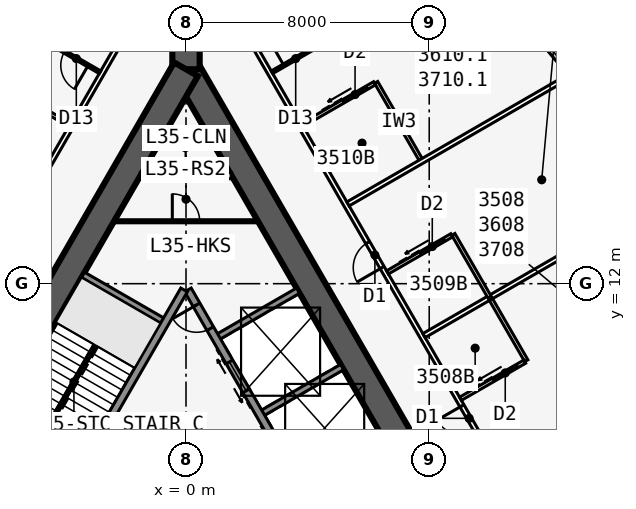
"""IFC4 building model, lengths in metres.
Left out: names, types, materials, properties, quantities, classifications, styles, units other than length and angle.
Written with IfcOpenShell. Run it as: python <this file> out.ifc"""

import sys

from ifc_helpers import new_model, si_unit, direction, frame, frame_2d, origin, place, context, subcontext, project, spatial, rectangle, extrude, element, fill, save


model = new_model("IFC4")
c1 = context("Model", 3, precision=1e-05, world=origin(), true_north=direction((0.0, 1.0)))
c2 = subcontext(c1, "Body", "Model", "MODEL_VIEW")
j1 = project(units=[si_unit("LENGTHUNIT", "METRE"), si_unit("PLANEANGLEUNIT", "RADIAN")], contexts=[c1])
p1 = place(None, origin())
s1 = spatial("IfcSite", under=j1, at=p1, CompositionType="ELEMENT")
p2 = place(p1, origin())
s2 = spatial("IfcBuilding", under=s1, at=p2, CompositionType="ELEMENT")
p3 = place(p2, frame((0.0, 0.0, 135.1)))
s3 = spatial("IfcBuildingStorey", under=s2, at=p3, CompositionType="ELEMENT", Elevation=135.1)
p4 = place(p3, frame((16.5, -9.526, 0.0), z_axis=(0.0, 0.0, 1.0), x_axis=(-0.499999749417, 0.866025548458, 0.0)))
e1 = element("IfcWall", 1, at=p4, inside=s3, PredefinedType="SHEAR", context=c2, shape_type="SweptSolid", body=[
    extrude(rectangle(XDim=33.0, YDim=0.9, at=frame_2d((16.5, 0.0))), origin(), (0.0, 0.0, 1.0), 3.4),
])
p5 = place(p4, frame((14.15, 0.0, 0.0)))
e2 = element("IfcOpeningElement", 2, at=p5, cuts=e1, PredefinedType="OPENING", context=c2, shape_type="SweptSolid", body=[
    extrude(rectangle(XDim=1.8, YDim=2.13, at=frame_2d((0.9, 1.065))), frame((0.0, 0.46, 0.0), z_axis=(0.0, -1.0, 0.0), x_axis=(1.0, 0.0, 0.0)), (0.0, 0.0, 1.0), 0.92),
])
p6 = place(p4, frame((12.6, 0.0, 0.0)))
e3 = element("IfcOpeningElement", 3, at=p6, cuts=e1, PredefinedType="OPENING", context=c2, shape_type="SweptSolid", body=[
    extrude(rectangle(XDim=1.0, YDim=2.13, at=frame_2d((0.5, 1.065))), frame((0.0, 0.46, 0.0), z_axis=(0.0, -1.0, 0.0), x_axis=(1.0, 0.0, 0.0)), (0.0, 0.0, 1.0), 0.92),
])
p7 = place(p3, frame((5.379, 2.586, 0.0), z_axis=(0.0, 0.0, 1.0), x_axis=(-0.500001375892, 0.866024609411, 0.0)))
e4 = element("IfcWall", 4, at=p7, inside=s3, PredefinedType="SOLIDWALL", context=c2, shape_type="SweptSolid", body=[
    extrude(rectangle(XDim=10.633, YDim=0.25, at=frame_2d((5.316, 0.0))), origin(), (0.0, 0.0, 1.0), 3.235),
])
p8 = place(p7, frame((9.164, 0.0, 0.0)))
e5 = element("IfcOpeningElement", 5, at=p8, cuts=e4, PredefinedType="OPENING", context=c2, shape_type="SweptSolid", body=[
    extrude(rectangle(XDim=0.9, YDim=2.13, at=frame_2d((0.45, 1.065))), frame((0.0, 0.135, 0.0), z_axis=(0.0, -1.0, 0.0), x_axis=(1.0, 0.0, 0.0)), (0.0, 0.0, 1.0), 0.27),
])
p9 = place(p7, frame((1.0, 0.0, 0.0)))
e6 = element("IfcOpeningElement", 6, at=p9, cuts=e4, PredefinedType="OPENING", context=c2, shape_type="SweptSolid", body=[
    extrude(rectangle(XDim=1.1, YDim=2.13, at=frame_2d((0.55, 1.065))), frame((0.0, 0.135, 0.0), z_axis=(0.0, -1.0, 0.0), x_axis=(1.0, 0.0, 0.0)), (0.0, 0.0, 1.0), 0.27),
])
p10 = place(p7, frame((3.9, 0.0, 0.0)))
e7 = element("IfcOpeningElement", 7, at=p10, cuts=e4, PredefinedType="OPENING", context=c2, shape_type="SweptSolid", body=[
    extrude(rectangle(XDim=1.1, YDim=2.13, at=frame_2d((0.55, 1.065))), frame((0.0, 0.135, 0.0), z_axis=(0.0, -1.0, 0.0), x_axis=(1.0, 0.0, 0.0)), (0.0, 0.0, 1.0), 0.27),
])
p11 = place(p7, frame((6.8, 0.0, 0.0)))
e8 = element("IfcOpeningElement", 8, at=p11, cuts=e4, PredefinedType="OPENING", context=c2, shape_type="SweptSolid", body=[
    extrude(rectangle(XDim=1.1, YDim=2.13, at=frame_2d((0.55, 1.065))), frame((0.0, 0.135, 0.0), z_axis=(0.0, -1.0, 0.0), x_axis=(1.0, 0.0, 0.0)), (0.0, 0.0, 1.0), 0.27),
])
for number, where, z_axis, x_axis in (
    (9, (2.429, 7.696, 0.0), (0.0, 0.0, 1.0), (0.866, 0.5, 0.0)),
    (10, (0.979, 10.207, 0.0), (0.0, 0.0, 1.0), (0.866, 0.5, 0.0)),
):
    element("IfcWall", number, at=place(p3, frame(where, z_axis=z_axis, x_axis=x_axis)), inside=s3, PredefinedType="SOLIDWALL", context=c2, shape_type="SweptSolid", body=[
        extrude(rectangle(XDim=3.125, YDim=0.2, at=frame_2d((1.562, 0.0))), origin(), (0.0, 0.0, 1.0), 3.235),
    ])
p12 = place(p3, frame((0.0, 19.052, 0.0), z_axis=(0.0, 0.0, 1.0), x_axis=(-0.499999749417, -0.866025548458, 0.0)))
e11 = element("IfcWall", 11, at=p12, inside=s3, PredefinedType="SHEAR", context=c2, shape_type="SweptSolid", body=[
    extrude(rectangle(XDim=33.0, YDim=0.9, at=frame_2d((16.5, 0.0))), origin(), (0.0, 0.0, 1.0), 3.4),
])
p13 = place(p12, frame((14.15, 0.0, 0.0)))
e12 = element("IfcOpeningElement", 12, at=p13, cuts=e11, PredefinedType="OPENING", context=c2, shape_type="SweptSolid", body=[
    extrude(rectangle(XDim=1.8, YDim=2.13, at=frame_2d((0.9, 1.065))), frame((0.0, 0.46, 0.0), z_axis=(0.0, -1.0, 0.0), x_axis=(1.0, 0.0, 0.0)), (0.0, 0.0, 1.0), 0.92),
])
p14 = place(p12, frame((12.6, 0.0, 0.0)))
e13 = element("IfcOpeningElement", 13, at=p14, cuts=e11, PredefinedType="OPENING", context=c2, shape_type="SweptSolid", body=[
    extrude(rectangle(XDim=1.0, YDim=2.13, at=frame_2d((0.5, 1.065))), frame((0.0, 0.46, 0.0), z_axis=(0.0, -1.0, 0.0), x_axis=(1.0, 0.0, 0.0)), (0.0, 0.0, 1.0), 0.92),
])
p15 = place(p3, frame((-0.062, 11.794, 0.0), z_axis=(0.0, 0.0, 1.0), x_axis=(-0.500006680225, -0.86602154692, 0.0)))
e14 = element("IfcWall", 14, at=p15, inside=s3, PredefinedType="SOLIDWALL", context=c2, shape_type="SweptSolid", body=[
    extrude(rectangle(XDim=7.733, YDim=0.25, at=frame_2d((3.866, 0.0))), origin(), (0.0, 0.0, 1.0), 3.235),
])
p16 = place(p3, frame((-0.679, 10.727, 0.0), z_axis=(0.0, 0.0, 1.0), x_axis=(-0.866022959057, 0.500004234368, 0.0)))
e15 = element("IfcWall", 15, at=p16, inside=s3, PredefinedType="SOLIDWALL", context=c2, shape_type="SweptSolid", body=[
    extrude(rectangle(XDim=3.125, YDim=0.2, at=frame_2d((1.562, 0.0))), origin(), (0.0, 0.0, 1.0), 3.235),
])
p17 = place(p3, frame((0.0, 19.052, 0.0), z_axis=(0.0, 0.0, 1.0), x_axis=(0.0, 1.0, 0.0)))
e16 = element("IfcWall", 16, at=p17, inside=s3, PredefinedType="SHEAR", context=c2, shape_type="SweptSolid", body=[
    extrude(rectangle(XDim=4.746, YDim=0.9, at=frame_2d((2.373, 0.0))), origin(), (0.0, 0.0, 1.0), 3.4),
])
p18 = place(p17, frame((1.8, 0.0, 0.0)))
e17 = element("IfcOpeningElement", 17, at=p18, cuts=e16, PredefinedType="OPENING", context=c2, shape_type="SweptSolid", body=[
    extrude(rectangle(XDim=1.8, YDim=2.13, at=frame_2d((0.9, 1.065))), frame((0.0, 0.46, 0.0), z_axis=(0.0, -1.0, 0.0), x_axis=(1.0, 0.0, 0.0)), (0.0, 0.0, 1.0), 0.92),
])
p19 = place(p3, frame((12.723, 18.868, 0.0), z_axis=(0.0, 0.0, 1.0), x_axis=(-0.641810386606, 0.766863369607, 0.0)))
e18 = element("IfcWall", 18, at=p19, inside=s3, PredefinedType="STANDARD", context=c2, shape_type="SweptSolid", body=[
    extrude(rectangle(XDim=5.076, YDim=0.25, at=frame_2d((2.538, 0.0))), origin(), (0.0, 0.0, 1.0), 3.235),
])
p20 = place(p19, frame((0.738, 0.0, 0.45)))
e19 = element("IfcOpeningElement", 19, at=p20, cuts=e18, PredefinedType="OPENING", context=c2, shape_type="SweptSolid", body=[
    extrude(rectangle(XDim=3.6, YDim=2.4, at=frame_2d((1.8, 1.2))), frame((0.0, 0.135, 0.0), z_axis=(0.0, -1.0, 0.0), x_axis=(1.0, 0.0, 0.0)), (0.0, 0.0, 1.0), 0.27),
])
p21 = place(p3, frame((20.027, -10.985, 0.0), z_axis=(0.0, 0.0, 1.0), x_axis=(-0.500001677587, 0.866024435227, 0.0)))
e20 = element("IfcWall", 20, at=p21, inside=s3, PredefinedType="PARTITIONING", context=c2, shape_type="SweptSolid", body=[
    extrude(rectangle(XDim=39.054, YDim=0.15, at=frame_2d((19.527, 0.0))), origin(), (0.0, 0.0, 1.0), 3.235),
])
p22 = place(p21, frame((1.558, 0.0, 0.0)))
e21 = element("IfcOpeningElement", 21, at=p22, cuts=e20, PredefinedType="OPENING", context=c2, shape_type="SweptSolid", body=[
    extrude(rectangle(XDim=0.95, YDim=2.13, at=frame_2d((0.475, 1.065))), frame((0.0, 0.085, 0.0), z_axis=(0.0, -1.0, 0.0), x_axis=(1.0, 0.0, 0.0)), (0.0, 0.0, 1.0), 0.17),
])
p23 = place(p21, frame((10.352, 0.0, 0.0)))
e22 = element("IfcOpeningElement", 22, at=p23, cuts=e20, PredefinedType="OPENING", context=c2, shape_type="SweptSolid", body=[
    extrude(rectangle(XDim=0.95, YDim=2.13, at=frame_2d((0.475, 1.065))), frame((0.0, 0.085, 0.0), z_axis=(0.0, -1.0, 0.0), x_axis=(1.0, 0.0, 0.0)), (0.0, 0.0, 1.0), 0.17),
])
p24 = place(p21, frame((17.152, 0.0, 0.0)))
e23 = element("IfcOpeningElement", 23, at=p24, cuts=e20, PredefinedType="OPENING", context=c2, shape_type="SweptSolid", body=[
    extrude(rectangle(XDim=0.95, YDim=2.13, at=frame_2d((0.475, 1.065))), frame((0.0, 0.085, 0.0), z_axis=(0.0, -1.0, 0.0), x_axis=(1.0, 0.0, 0.0)), (0.0, 0.0, 1.0), 0.17),
])
p25 = place(p21, frame((20.952, 0.0, 0.0)))
e24 = element("IfcOpeningElement", 24, at=p25, cuts=e20, PredefinedType="OPENING", context=c2, shape_type="SweptSolid", body=[
    extrude(rectangle(XDim=0.95, YDim=2.13, at=frame_2d((0.475, 1.065))), frame((0.0, 0.085, 0.0), z_axis=(0.0, -1.0, 0.0), x_axis=(1.0, 0.0, 0.0)), (0.0, 0.0, 1.0), 0.17),
])
p26 = place(p21, frame((27.152, 0.0, 0.0)))
e25 = element("IfcOpeningElement", 25, at=p26, cuts=e20, PredefinedType="OPENING", context=c2, shape_type="SweptSolid", body=[
    extrude(rectangle(XDim=0.95, YDim=2.13, at=frame_2d((0.475, 1.065))), frame((0.0, 0.085, 0.0), z_axis=(0.0, -1.0, 0.0), x_axis=(1.0, 0.0, 0.0)), (0.0, 0.0, 1.0), 0.17),
])
p27 = place(p21, frame((36.546, 0.0, 0.0)))
e26 = element("IfcOpeningElement", 26, at=p27, cuts=e20, PredefinedType="OPENING", context=c2, shape_type="SweptSolid", body=[
    extrude(rectangle(XDim=0.95, YDim=2.13, at=frame_2d((0.475, 1.065))), frame((0.0, 0.085, 0.0), z_axis=(0.0, -1.0, 0.0), x_axis=(1.0, 0.0, 0.0)), (0.0, 0.0, 1.0), 0.17),
])
p28 = place(p3, frame((10.329, 5.963, 0.0), z_axis=(0.0, 0.0, 1.0), x_axis=(0.866025170687, 0.500000403736, 0.0)))
e27 = element("IfcWall", 27, at=p28, inside=s3, PredefinedType="PARTITIONING", context=c2, shape_type="SweptSolid", body=[
    extrude(rectangle(XDim=9.099, YDim=0.15, at=frame_2d((4.549, 0.0))), origin(), (0.0, 0.0, 1.0), 2.389),
])
p29 = place(p3, frame((7.829, 10.293, 0.0), z_axis=(0.0, 0.0, 1.0), x_axis=(0.866027015393, 0.499997208602, 0.0)))
e28 = element("IfcWall", 28, at=p29, inside=s3, PredefinedType="PARTITIONING", context=c2, shape_type="SweptSolid", body=[
    extrude(rectangle(XDim=8.922, YDim=0.15, at=frame_2d((4.461, 0.0))), origin(), (0.0, 0.0, 1.0), 2.389),
])
p30 = place(p3, frame((5.329, 14.623, 0.0), z_axis=(0.0, 0.0, 1.0), x_axis=(0.866011723728, 0.500023693804, 0.0)))
e29 = element("IfcWall", 29, at=p30, inside=s3, PredefinedType="PARTITIONING", context=c2, shape_type="SweptSolid", body=[
    extrude(rectangle(XDim=8.395, YDim=0.15, at=frame_2d((4.198, 0.0))), origin(), (0.0, 0.0, 1.0), 2.389),
])
p31 = place(p3, frame((2.829, 18.954, 0.0), z_axis=(0.0, 0.0, 1.0), x_axis=(0.866015739374, 0.500016738876, 0.0)))
e30 = element("IfcWall", 30, at=p31, inside=s3, PredefinedType="PARTITIONING", context=c2, shape_type="SweptSolid", body=[
    extrude(rectangle(XDim=7.516, YDim=0.1, at=frame_2d((3.758, 0.0))), origin(), (0.0, 0.0, 1.0), 2.389),
])
p32 = place(p31, frame((0.45, 0.0, 0.0)))
e31 = element("IfcOpeningElement", 31, at=p32, cuts=e30, PredefinedType="OPENING", context=c2, shape_type="SweptSolid", body=[
    extrude(rectangle(XDim=0.9, YDim=2.13, at=frame_2d((0.45, 1.065))), frame((0.0, 0.06, 0.0), z_axis=(0.0, -1.0, 0.0), x_axis=(1.0, 0.0, 0.0)), (0.0, 0.0, 1.0), 0.12),
])
p33 = place(p3, frame((11.194, 9.465, 0.0), z_axis=(0.0, 0.0, 1.0), x_axis=(-0.500077600433, 0.865980596518, 0.0)))
e32 = element("IfcWall", 32, at=p33, inside=s3, PredefinedType="PLUMBINGWALL", context=c2, shape_type="SweptSolid", body=[
    extrude(rectangle(XDim=2.4, YDim=0.12, at=frame_2d((1.2, 0.0))), origin(), (0.0, 0.0, 1.0), 3.235),
])
p34 = place(p3, frame((9.029, 8.215, 0.0), z_axis=(0.0, 0.0, 1.0), x_axis=(0.866023955769, 0.500002508028, 0.0)))
e33 = element("IfcWall", 33, at=p34, inside=s3, PredefinedType="PLUMBINGWALL", context=c2, shape_type="SweptSolid", body=[
    extrude(rectangle(XDim=2.44, YDim=0.12, at=frame_2d((1.22, 0.0))), origin(), (0.0, 0.0, 1.0), 3.235),
])
p35 = place(p34, frame((1.25, 0.0, 0.0)))
e34 = element("IfcOpeningElement", 34, at=p35, cuts=e33, PredefinedType="OPENING", context=c2, shape_type="SweptSolid", body=[
    extrude(rectangle(XDim=0.9, YDim=2.13, at=frame_2d((0.45, 1.065))), frame((0.0, 0.07, 0.0), z_axis=(0.0, -1.0, 0.0), x_axis=(1.0, 0.0, 0.0)), (0.0, 0.0, 1.0), 0.14),
])
p36 = place(p3, frame((9.993, 11.543, 0.0), z_axis=(0.0, 0.0, 1.0), x_axis=(-0.500001309137, 0.866024647952, 0.0)))
e35 = element("IfcWall", 35, at=p36, inside=s3, PredefinedType="PLUMBINGWALL", context=c2, shape_type="SweptSolid", body=[
    extrude(rectangle(XDim=2.4, YDim=0.12, at=frame_2d((1.2, 0.0))), origin(), (0.0, 0.0, 1.0), 3.235),
])
p37 = place(p3, frame((6.628, 12.372, 0.0), z_axis=(0.0, 0.0, 1.0), x_axis=(0.866005645448, 0.500034220881, 0.0)))
e36 = element("IfcWall", 36, at=p37, inside=s3, PredefinedType="PLUMBINGWALL", context=c2, shape_type="SweptSolid", body=[
    extrude(rectangle(XDim=2.44, YDim=0.12, at=frame_2d((1.22, 0.0))), origin(), (0.0, 0.0, 1.0), 3.235),
])
p38 = place(p37, frame((1.25, 0.0, 0.0)))
e37 = element("IfcOpeningElement", 37, at=p38, cuts=e36, PredefinedType="OPENING", context=c2, shape_type="SweptSolid", body=[
    extrude(rectangle(XDim=0.9, YDim=2.13, at=frame_2d((0.45, 1.065))), frame((0.0, 0.07, 0.0), z_axis=(0.0, -1.0, 0.0), x_axis=(1.0, 0.0, 0.0)), (0.0, 0.0, 1.0), 0.14),
])
p39 = place(p3, frame((7.753, 16.023, 0.0), z_axis=(0.0, 0.0, 1.0), x_axis=(-0.499990139034, 0.866031096941, 0.0)))
e38 = element("IfcWall", 38, at=p39, inside=s3, PredefinedType="PLUMBINGWALL", context=c2, shape_type="SweptSolid", body=[
    extrude(rectangle(XDim=3.0, YDim=0.12, at=frame_2d((1.5, 0.0))), origin(), (0.0, 0.0, 1.0), 3.235),
])
p40 = place(p3, frame((3.829, 17.221, 0.0), z_axis=(0.0, 0.0, 1.0), x_axis=(0.865997131366, 0.500048966069, 0.0)))
e39 = element("IfcWall", 39, at=p40, inside=s3, PredefinedType="PLUMBINGWALL", context=c2, shape_type="SweptSolid", body=[
    extrude(rectangle(XDim=2.74, YDim=0.12, at=frame_2d((1.37, 0.0))), origin(), (0.0, 0.0, 1.0), 3.235),
])
p41 = place(p40, frame((1.55, 0.0, 0.0)))
e40 = element("IfcOpeningElement", 40, at=p41, cuts=e39, PredefinedType="OPENING", context=c2, shape_type="SweptSolid", body=[
    extrude(rectangle(XDim=0.9, YDim=2.13, at=frame_2d((0.45, 1.065))), frame((0.0, 0.07, 0.0), z_axis=(0.0, -1.0, 0.0), x_axis=(1.0, 0.0, 0.0)), (0.0, 0.0, 1.0), 0.14),
])
p42 = place(p3, frame((-0.5, 22.836, 0.0), z_axis=(0.0, 0.0, 1.0), x_axis=(-0.500001677587, -0.866024435227, 0.0)))
e41 = element("IfcWall", 41, at=p42, inside=s3, PredefinedType="PARTITIONING", context=c2, shape_type="SweptSolid", body=[
    extrude(rectangle(XDim=39.054, YDim=0.15, at=frame_2d((19.527, 0.0))), origin(), (0.0, 0.0, 1.0), 3.235),
])
p43 = place(p42, frame((1.558, 0.0, 0.0)))
e42 = element("IfcOpeningElement", 42, at=p43, cuts=e41, PredefinedType="OPENING", context=c2, shape_type="SweptSolid", body=[
    extrude(rectangle(XDim=0.95, YDim=2.13, at=frame_2d((0.475, 1.065))), frame((0.0, 0.085, 0.0), z_axis=(0.0, -1.0, 0.0), x_axis=(1.0, 0.0, 0.0)), (0.0, 0.0, 1.0), 0.17),
])
p44 = place(p42, frame((10.952, 0.0, 0.0)))
e43 = element("IfcOpeningElement", 43, at=p44, cuts=e41, PredefinedType="OPENING", context=c2, shape_type="SweptSolid", body=[
    extrude(rectangle(XDim=0.95, YDim=2.13, at=frame_2d((0.475, 1.065))), frame((0.0, 0.085, 0.0), z_axis=(0.0, -1.0, 0.0), x_axis=(1.0, 0.0, 0.0)), (0.0, 0.0, 1.0), 0.17),
])
p45 = place(p42, frame((17.752, 0.0, 0.0)))
e44 = element("IfcOpeningElement", 44, at=p45, cuts=e41, PredefinedType="OPENING", context=c2, shape_type="SweptSolid", body=[
    extrude(rectangle(XDim=0.95, YDim=2.13, at=frame_2d((0.475, 1.065))), frame((0.0, 0.085, 0.0), z_axis=(0.0, -1.0, 0.0), x_axis=(1.0, 0.0, 0.0)), (0.0, 0.0, 1.0), 0.17),
])
p46 = place(p42, frame((21.552, 0.0, 0.0)))
e45 = element("IfcOpeningElement", 45, at=p46, cuts=e41, PredefinedType="OPENING", context=c2, shape_type="SweptSolid", body=[
    extrude(rectangle(XDim=0.95, YDim=2.13, at=frame_2d((0.475, 1.065))), frame((0.0, 0.085, 0.0), z_axis=(0.0, -1.0, 0.0), x_axis=(1.0, 0.0, 0.0)), (0.0, 0.0, 1.0), 0.17),
])
p47 = place(p42, frame((30.952, 0.0, 0.0)))
e46 = element("IfcOpeningElement", 46, at=p47, cuts=e41, PredefinedType="OPENING", context=c2, shape_type="SweptSolid", body=[
    extrude(rectangle(XDim=0.95, YDim=2.13, at=frame_2d((0.475, 1.065))), frame((0.0, 0.085, 0.0), z_axis=(0.0, -1.0, 0.0), x_axis=(1.0, 0.0, 0.0)), (0.0, 0.0, 1.0), 0.17),
])
p48 = place(p42, frame((37.752, 0.0, 0.0)))
e47 = element("IfcOpeningElement", 47, at=p48, cuts=e41, PredefinedType="OPENING", context=c2, shape_type="SweptSolid", body=[
    extrude(rectangle(XDim=0.95, YDim=2.13, at=frame_2d((0.475, 1.065))), frame((0.0, 0.085, 0.0), z_axis=(0.0, -1.0, 0.0), x_axis=(1.0, 0.0, 0.0)), (0.0, 0.0, 1.0), 0.17),
])
p49 = place(p3, frame((-2.829, 18.954, 0.0), z_axis=(0.0, 0.0, 1.0), x_axis=(-0.866015739374, 0.500016738876, 0.0)))
e48 = element("IfcWall", 48, at=p49, inside=s3, PredefinedType="PARTITIONING", context=c2, shape_type="SweptSolid", body=[
    extrude(rectangle(XDim=7.516, YDim=0.1, at=frame_2d((3.758, 0.0))), origin(), (0.0, 0.0, 1.0), 2.389),
])
p50 = place(p49, frame((0.45, 0.0, 0.0)))
e49 = element("IfcOpeningElement", 49, at=p50, cuts=e48, PredefinedType="OPENING", context=c2, shape_type="SweptSolid", body=[
    extrude(rectangle(XDim=0.9, YDim=2.13, at=frame_2d((0.45, 1.065))), frame((0.0, 0.06, 0.0), z_axis=(0.0, -1.0, 0.0), x_axis=(1.0, 0.0, 0.0)), (0.0, 0.0, 1.0), 0.12),
])
p51 = place(p3, frame((-3.829, 17.221, 0.0), z_axis=(0.0, 0.0, 1.0), x_axis=(-0.865997131366, 0.500048966069, 0.0)))
e50 = element("IfcWall", 50, at=p51, inside=s3, PredefinedType="PLUMBINGWALL", context=c2, shape_type="SweptSolid", body=[
    extrude(rectangle(XDim=2.74, YDim=0.12, at=frame_2d((1.37, 0.0))), origin(), (0.0, 0.0, 1.0), 3.235),
])
p52 = place(p51, frame((1.55, 0.0, 0.0)))
e51 = element("IfcOpeningElement", 51, at=p52, cuts=e50, PredefinedType="OPENING", context=c2, shape_type="SweptSolid", body=[
    extrude(rectangle(XDim=0.9, YDim=2.13, at=frame_2d((0.45, 1.065))), frame((0.0, 0.07, 0.0), z_axis=(0.0, -1.0, 0.0), x_axis=(1.0, 0.0, 0.0)), (0.0, 0.0, 1.0), 0.14),
])
p53 = place(p3, frame((-1.501, 15.552, 0.0), z_axis=(0.0, 0.0, 1.0), x_axis=(1.0, 0.0, 0.0)))
e52 = element("IfcWall", 52, at=p53, inside=s3, PredefinedType="SOLIDWALL", context=c2, shape_type="SweptSolid", body=[
    extrude(rectangle(XDim=3.002, YDim=0.2, at=frame_2d((1.501, 0.0))), origin(), (0.0, 0.0, 1.0), 3.235),
])
p54 = place(p3, frame((-2.367, 14.052, 0.0), z_axis=(0.0, 0.0, 1.0), x_axis=(1.0, 0.0, 0.0)))
e53 = element("IfcWall", 53, at=p54, inside=s3, PredefinedType="PARTITIONING", context=c2, shape_type="SweptSolid", body=[
    extrude(rectangle(XDim=4.734, YDim=0.1, at=frame_2d((2.367, 0.0))), origin(), (0.0, 0.0, 1.0), 3.235),
])
p55 = place(p54, frame((1.917, 0.0, 0.0)))
e54 = element("IfcOpeningElement", 54, at=p55, cuts=e53, PredefinedType="OPENING", context=c2, shape_type="SweptSolid", body=[
    extrude(rectangle(XDim=0.9, YDim=2.13, at=frame_2d((0.45, 1.065))), frame((0.0, 0.06, 0.0), z_axis=(0.0, -1.0, 0.0), x_axis=(1.0, 0.0, 0.0)), (0.0, 0.0, 1.0), 0.12),
])
p56 = place(p3, frame((-2.988, 9.978, 0.0), z_axis=(0.0, 0.0, 1.0), x_axis=(-0.499992232847, -0.866029888106, 0.0)))
e55 = element("IfcWall", 55, at=p56, inside=s3, PredefinedType="SOLIDWALL", context=c2, shape_type="SweptSolid", body=[
    extrude(rectangle(XDim=2.794, YDim=0.1, at=frame_2d((1.397, 0.0))), origin(), (0.0, 0.0, 1.0), 3.4),
])
p57 = place(p20, origin())
e56 = element("IfcWindow", 56, at=p57, inside=s3, PartitioningType="SINGLE_PANEL", PredefinedType="WINDOW", context=c2, shape_type="SweptSolid", body=[
    extrude(rectangle(XDim=3.6, YDim=2.4, at=frame_2d((1.8, 1.2))), frame((0.0, 0.03, 0.0), z_axis=(0.0, -1.0, 0.0), x_axis=(1.0, 0.0, 0.0)), (0.0, 0.0, 1.0), 0.06),
])
fill(e19, e56)
p58 = place(p32, origin())
e57 = element("IfcDoor", 57, at=p58, inside=s3, OperationType="SINGLE_SWING_LEFT", PredefinedType="DOOR", context=c2, shape_type="SweptSolid", body=[
    extrude(rectangle(XDim=0.9, YDim=2.13, at=frame_2d((0.45, 1.065))), frame((0.0, 0.025, 0.0), z_axis=(0.0, -1.0, 0.0), x_axis=(1.0, 0.0, 0.0)), (0.0, 0.0, 1.0), 0.05),
])
fill(e31, e57)
p59 = place(p35, origin())
e58 = element("IfcDoor", 58, at=p59, inside=s3, OperationType="SLIDING_TO_LEFT", PredefinedType="DOOR", context=c2, shape_type="SweptSolid", body=[
    extrude(rectangle(XDim=0.9, YDim=2.13, at=frame_2d((0.45, 1.065))), frame((0.0, 0.025, 0.0), z_axis=(0.0, -1.0, 0.0), x_axis=(1.0, 0.0, 0.0)), (0.0, 0.0, 1.0), 0.05),
])
fill(e34, e58)
p60 = place(p25, origin())
e59 = element("IfcDoor", 59, at=p60, inside=s3, OperationType="SINGLE_SWING_RIGHT", PredefinedType="DOOR", context=c2, shape_type="SweptSolid", body=[
    extrude(rectangle(XDim=0.95, YDim=2.13, at=frame_2d((0.475, 1.065))), frame((0.0, 0.025, 0.0), z_axis=(0.0, -1.0, 0.0), x_axis=(1.0, 0.0, 0.0)), (0.0, 0.0, 1.0), 0.05),
])
fill(e24, e59)
p61 = place(p38, origin())
e60 = element("IfcDoor", 60, at=p61, inside=s3, OperationType="SLIDING_TO_LEFT", PredefinedType="DOOR", context=c2, shape_type="SweptSolid", body=[
    extrude(rectangle(XDim=0.9, YDim=2.13, at=frame_2d((0.45, 1.065))), frame((0.0, 0.025, 0.0), z_axis=(0.0, -1.0, 0.0), x_axis=(1.0, 0.0, 0.0)), (0.0, 0.0, 1.0), 0.05),
])
fill(e37, e60)
p62 = place(p26, origin())
e61 = element("IfcDoor", 61, at=p62, inside=s3, OperationType="SINGLE_SWING_LEFT", PredefinedType="DOOR", context=c2, shape_type="SweptSolid", body=[
    extrude(rectangle(XDim=0.95, YDim=2.13, at=frame_2d((0.475, 1.065))), frame((0.0, 0.025, 0.0), z_axis=(0.0, -1.0, 0.0), x_axis=(1.0, 0.0, 0.0)), (0.0, 0.0, 1.0), 0.05),
])
fill(e25, e61)
p63 = place(p41, origin())
e62 = element("IfcDoor", 62, at=p63, inside=s3, OperationType="SLIDING_TO_LEFT", PredefinedType="DOOR", context=c2, shape_type="SweptSolid", body=[
    extrude(rectangle(XDim=0.9, YDim=2.13, at=frame_2d((0.45, 1.065))), frame((0.0, 0.025, 0.0), z_axis=(0.0, -1.0, 0.0), x_axis=(1.0, 0.0, 0.0)), (0.0, 0.0, 1.0), 0.05),
])
fill(e40, e62)
p64 = place(p50, origin())
e63 = element("IfcDoor", 63, at=p64, inside=s3, OperationType="SINGLE_SWING_LEFT", PredefinedType="DOOR", context=c2, shape_type="SweptSolid", body=[
    extrude(rectangle(XDim=0.9, YDim=2.13, at=frame_2d((0.45, 1.065))), frame((0.0, 0.025, 0.0), z_axis=(0.0, -1.0, 0.0), x_axis=(1.0, 0.0, 0.0)), (0.0, 0.0, 1.0), 0.05),
])
fill(e49, e63)
p65 = place(p55, origin())
e64 = element("IfcDoor", 64, at=p65, inside=s3, OperationType="SINGLE_SWING_LEFT", PredefinedType="DOOR", context=c2, shape_type="SweptSolid", body=[
    extrude(rectangle(XDim=0.9, YDim=2.13, at=frame_2d((0.45, 1.065))), frame((0.0, 0.025, 0.0), z_axis=(0.0, -1.0, 0.0), x_axis=(1.0, 0.0, 0.0)), (0.0, 0.0, 1.0), 0.05),
])
fill(e54, e64)
p66 = place(p8, origin())
e65 = element("IfcDoor", 65, at=p66, inside=s3, OperationType="SINGLE_SWING_RIGHT", PredefinedType="DOOR", context=c2, shape_type="SweptSolid", body=[
    extrude(rectangle(XDim=0.9, YDim=2.13, at=frame_2d((0.45, 1.065))), frame((0.0, 0.025, 0.0), z_axis=(0.0, -1.0, 0.0), x_axis=(1.0, 0.0, 0.0)), (0.0, 0.0, 1.0), 0.05),
])
fill(e5, e65)
p67 = place(p11, origin())
e66 = element("IfcDoor", 66, at=p67, inside=s3, OperationType="DOUBLE_DOOR_SLIDING", PredefinedType="USERDEFINED", context=c2, shape_type="SweptSolid", body=[
    extrude(rectangle(XDim=1.1, YDim=2.13, at=frame_2d((0.55, 1.065))), frame((0.0, 0.025, 0.0), z_axis=(0.0, -1.0, 0.0), x_axis=(1.0, 0.0, 0.0)), (0.0, 0.0, 1.0), 0.05),
])
fill(e8, e66)
save(model, sys.argv[1])
